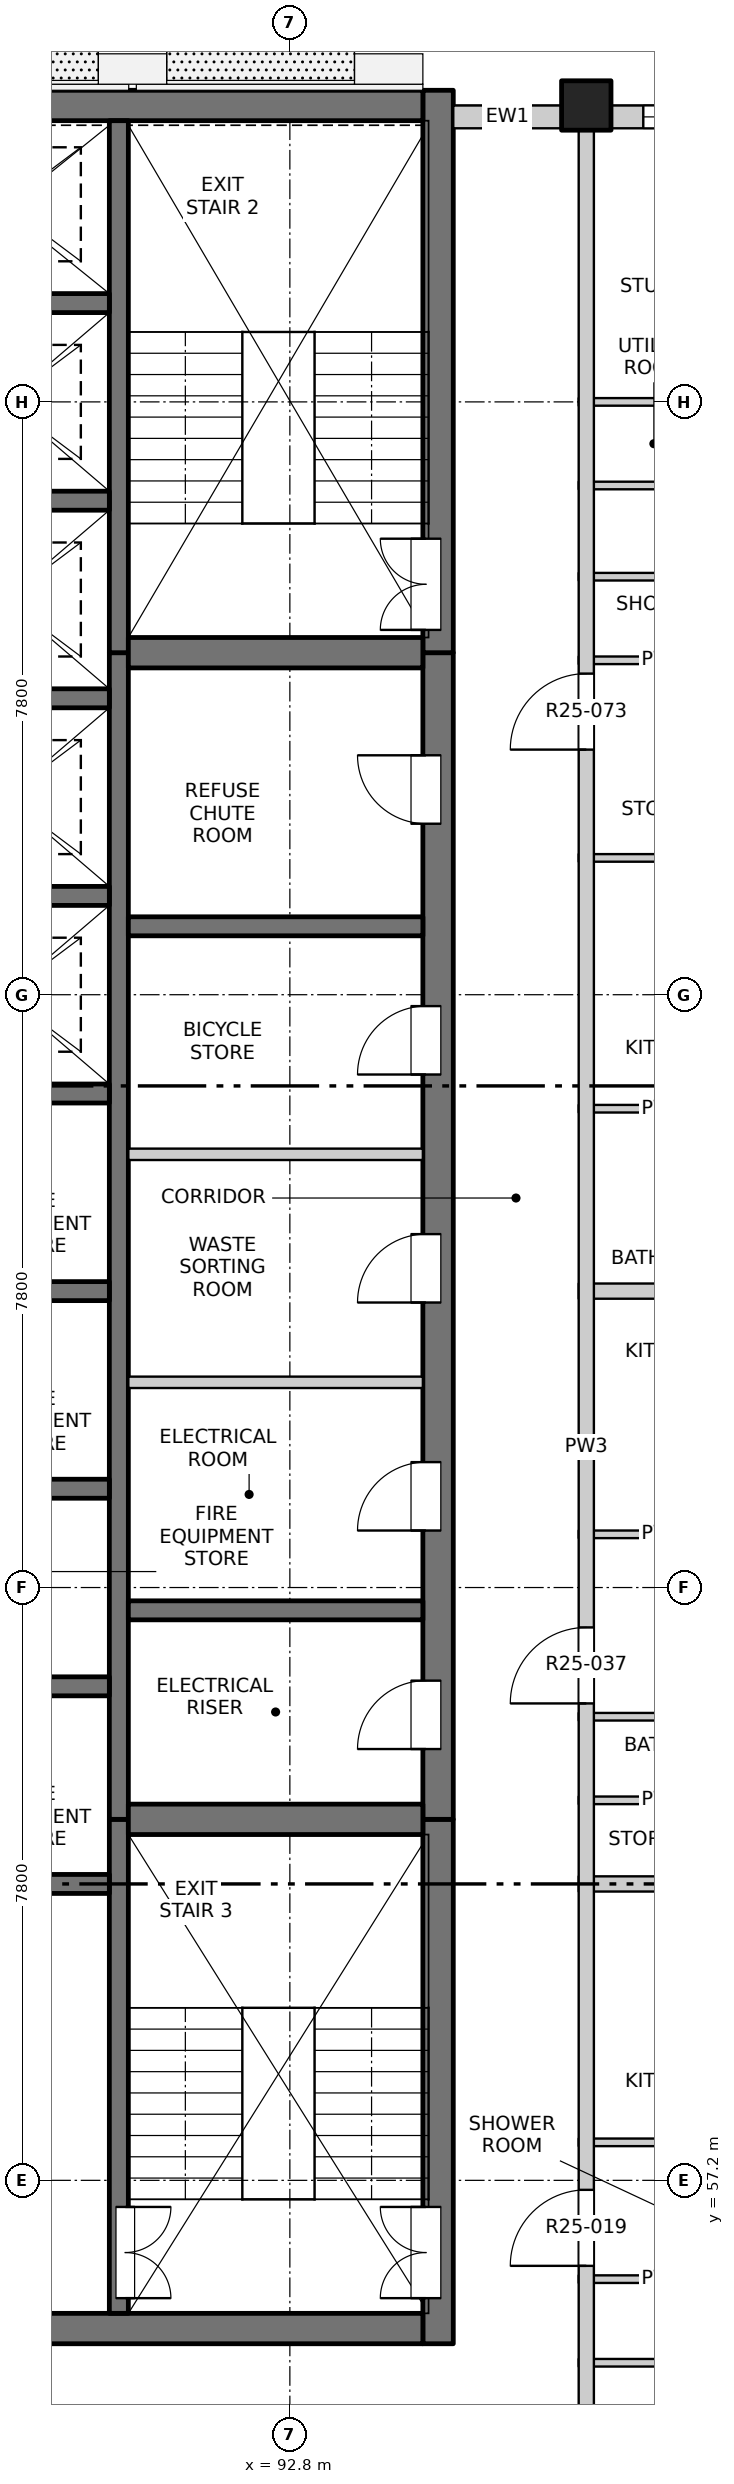
"""IFC4 building model, lengths in metres.
Left out: names, types, materials, properties, quantities, classifications, styles, units other than length and angle.
Written with IfcOpenShell. Run it as: python <this file> out.ifc"""

import sys

from ifc_helpers import new_model, si_unit, direction, frame, frame_2d, origin, origin_2d, place, context, subcontext, project, spatial, rectangle, extrude, element, fill, save


model = new_model("IFC4")
c1 = context("Model", 3, precision=1e-05, world=origin(), true_north=direction((0.0, 1.0)))
c2 = subcontext(c1, "Body", "Model", "MODEL_VIEW")
j1 = project(units=[si_unit("LENGTHUNIT", "METRE"), si_unit("PLANEANGLEUNIT", "RADIAN")], contexts=[c1])
p1 = place(None, origin())
s1 = spatial("IfcSite", under=j1, at=p1, CompositionType="ELEMENT")
p2 = place(p1, origin())
s2 = spatial("IfcBuilding", under=s1, at=p2, CompositionType="ELEMENT")
p3 = place(p2, frame((0.0, 0.0, 252.8)))
s3 = spatial("IfcBuildingStorey", under=s2, at=p3, CompositionType="ELEMENT", Elevation=252.8)
p4 = place(p3, frame((96.7, 84.5, -0.25), z_axis=(0.0, 0.0, 1.0), x_axis=(1.0, 0.0, 0.0)))
e1 = element("IfcColumn", 1, at=p4, inside=s3, PredefinedType="COLUMN", context=c2, shape_type="SweptSolid", body=[
    extrude(rectangle(XDim=0.65, YDim=0.65, at=origin_2d()), origin(), (0.0, 0.0, 1.0), 3.4),
])
p5 = place(p3, frame((94.75, 55.05, -0.25), z_axis=(0.0, 0.0, 1.0), x_axis=(0.0, 1.0, 0.0)))
e2 = element("IfcWall", 2, at=p5, inside=s3, PredefinedType="SOLIDWALL", context=c2, shape_type="SweptSolid", body=[
    extrude(rectangle(XDim=6.9, YDim=0.4, at=frame_2d((3.45, 0.0))), origin(), (0.0, 0.0, 1.0), 3.4),
])
p6 = place(p5, frame((0.6, 0.0, 0.25)))
e3 = element("IfcOpeningElement", 3, at=p6, cuts=e2, PredefinedType="OPENING", context=c2, shape_type="SweptSolid", body=[
    extrude(rectangle(XDim=1.2, YDim=2.1, at=frame_2d((0.6, 1.05))), frame((0.0, 0.21, 0.0), z_axis=(0.0, -1.0, 0.0), x_axis=(1.0, 0.0, 0.0)), (0.0, 0.0, 1.0), 0.42),
])
p7 = place(p3, frame((94.75, 61.95, -0.25), z_axis=(0.0, 0.0, 1.0), x_axis=(0.0, 1.0, 0.0)))
e4 = element("IfcWall", 4, at=p7, inside=s3, PredefinedType="SOLIDWALL", context=c2, shape_type="SweptSolid", body=[
    extrude(rectangle(XDim=15.35, YDim=0.4, at=frame_2d((7.675, 0.0))), origin(), (0.0, 0.0, 1.0), 3.4),
])
p8 = place(p7, frame((0.925, 0.0, 0.25)))
e5 = element("IfcOpeningElement", 5, at=p8, cuts=e4, PredefinedType="OPENING", context=c2, shape_type="SweptSolid", body=[
    extrude(rectangle(XDim=0.9, YDim=2.1, at=frame_2d((0.45, 1.05))), frame((0.0, 0.21, 0.0), z_axis=(0.0, -1.0, 0.0), x_axis=(1.0, 0.0, 0.0)), (0.0, 0.0, 1.0), 0.42),
])
p9 = place(p7, frame((3.8, 0.0, 0.25)))
e6 = element("IfcOpeningElement", 6, at=p9, cuts=e4, PredefinedType="OPENING", context=c2, shape_type="SweptSolid", body=[
    extrude(rectangle(XDim=0.9, YDim=2.1, at=frame_2d((0.45, 1.05))), frame((0.0, 0.21, 0.0), z_axis=(0.0, -1.0, 0.0), x_axis=(1.0, 0.0, 0.0)), (0.0, 0.0, 1.0), 0.42),
])
p10 = place(p7, frame((6.8, 0.0, 0.25)))
e7 = element("IfcOpeningElement", 7, at=p10, cuts=e4, PredefinedType="OPENING", context=c2, shape_type="SweptSolid", body=[
    extrude(rectangle(XDim=0.9, YDim=2.1, at=frame_2d((0.45, 1.05))), frame((0.0, 0.21, 0.0), z_axis=(0.0, -1.0, 0.0), x_axis=(1.0, 0.0, 0.0)), (0.0, 0.0, 1.0), 0.42),
])
p11 = place(p7, frame((9.8, 0.0, 0.25)))
e8 = element("IfcOpeningElement", 8, at=p11, cuts=e4, PredefinedType="OPENING", context=c2, shape_type="SweptSolid", body=[
    extrude(rectangle(XDim=0.9, YDim=2.1, at=frame_2d((0.45, 1.05))), frame((0.0, 0.21, 0.0), z_axis=(0.0, -1.0, 0.0), x_axis=(1.0, 0.0, 0.0)), (0.0, 0.0, 1.0), 0.42),
])
p12 = place(p7, frame((13.1, 0.0, 0.25)))
e9 = element("IfcOpeningElement", 9, at=p12, cuts=e4, PredefinedType="OPENING", context=c2, shape_type="SweptSolid", body=[
    extrude(rectangle(XDim=0.9, YDim=2.1, at=frame_2d((0.45, 1.05))), frame((0.0, 0.21, 0.0), z_axis=(0.0, -1.0, 0.0), x_axis=(1.0, 0.0, 0.0)), (0.0, 0.0, 1.0), 0.42),
])
p13 = place(p3, frame((94.75, 77.3, -0.25), z_axis=(0.0, 0.0, 1.0), x_axis=(0.0, 1.0, 0.0)))
e10 = element("IfcWall", 10, at=p13, inside=s3, PredefinedType="SOLIDWALL", context=c2, shape_type="SweptSolid", body=[
    extrude(rectangle(XDim=7.4, YDim=0.4, at=frame_2d((3.7, 0.0))), origin(), (0.0, 0.0, 1.0), 3.4),
])
p14 = place(p13, frame((0.3, 0.0, 0.25)))
e11 = element("IfcOpeningElement", 11, at=p14, cuts=e10, PredefinedType="OPENING", context=c2, shape_type="SweptSolid", body=[
    extrude(rectangle(XDim=1.2, YDim=2.1, at=frame_2d((0.6, 1.05))), frame((0.0, 0.21, 0.0), z_axis=(0.0, -1.0, 0.0), x_axis=(1.0, 0.0, 0.0)), (0.0, 0.0, 1.0), 0.42),
])
p15 = place(p3, frame((75.45, 55.25, -0.25), z_axis=(0.0, 0.0, 1.0), x_axis=(1.0, 0.0, 0.0)))
e12 = element("IfcWall", 12, at=p15, inside=s3, PredefinedType="SOLIDWALL", context=c2, shape_type="SweptSolid", body=[
    extrude(rectangle(XDim=19.1, YDim=0.4, at=frame_2d((9.55, 0.0))), origin(), (0.0, 0.0, 1.0), 3.4),
])
p16 = place(p15, frame((8.8, 0.0, 0.25)))
e13 = element("IfcOpeningElement", 13, at=p16, cuts=e12, PredefinedType="OPENING", context=c2, shape_type="SweptSolid", body=[
    extrude(rectangle(XDim=1.5, YDim=2.1, at=frame_2d((0.75, 1.05))), frame((0.0, 0.21, 0.0), z_axis=(0.0, -1.0, 0.0), x_axis=(1.0, 0.0, 0.0)), (0.0, 0.0, 1.0), 0.42),
])
p17 = place(p3, frame((75.45, 84.5, -0.25), z_axis=(0.0, 0.0, 1.0), x_axis=(1.0, 0.0, 0.0)))
e14 = element("IfcWall", 14, at=p17, inside=s3, PredefinedType="SOLIDWALL", context=c2, shape_type="SweptSolid", body=[
    extrude(rectangle(XDim=19.1, YDim=0.4, at=frame_2d((9.55, 0.0))), origin(), (0.0, 0.0, 1.0), 3.4),
])
p18 = place(p3, frame((90.55, 55.45, -0.25), z_axis=(0.0, 0.0, 1.0), x_axis=(0.0, 1.0, 0.0)))
e15 = element("IfcWall", 15, at=p18, inside=s3, PredefinedType="SOLIDWALL", context=c2, shape_type="SweptSolid", body=[
    extrude(rectangle(XDim=6.5, YDim=0.25, at=frame_2d((3.25, 0.0))), origin(), (0.0, 0.0, 1.0), 3.4),
])
p19 = place(p18, frame((0.2, 0.0, 0.25)))
e16 = element("IfcOpeningElement", 16, at=p19, cuts=e15, PredefinedType="OPENING", context=c2, shape_type="SweptSolid", body=[
    extrude(rectangle(XDim=1.2, YDim=2.1, at=frame_2d((0.6, 1.05))), frame((0.0, 0.135, 0.0), z_axis=(0.0, -1.0, 0.0), x_axis=(1.0, 0.0, 0.0)), (0.0, 0.0, 1.0), 0.27),
])
p20 = place(p3, frame((90.55, 61.95, -0.25), z_axis=(0.0, 0.0, 1.0), x_axis=(0.0, 1.0, 0.0)))
e17 = element("IfcWall", 17, at=p20, inside=s3, PredefinedType="SOLIDWALL", context=c2, shape_type="SweptSolid", body=[
    extrude(rectangle(XDim=15.35, YDim=0.25, at=frame_2d((7.675, 0.0))), origin(), (0.0, 0.0, 1.0), 3.4),
])
p21 = place(p3, frame((90.55, 77.3, -0.25), z_axis=(0.0, 0.0, 1.0), x_axis=(0.0, 1.0, 0.0)))
e18 = element("IfcWall", 18, at=p21, inside=s3, PredefinedType="SOLIDWALL", context=c2, shape_type="SweptSolid", body=[
    extrude(rectangle(XDim=7.0, YDim=0.25, at=frame_2d((3.5, 0.0))), origin(), (0.0, 0.0, 1.0), 3.4),
])
for number, where, z_axis, x_axis in (
    (19, (87.425, 61.1, -0.25), (0.0, 0.0, 1.0), (1.0, 0.0, 0.0)),
    (20, (87.425, 63.7, -0.25), (0.0, 0.0, 1.0), (1.0, 0.0, 0.0)),
    (21, (87.425, 66.3, -0.25), (0.0, 0.0, 1.0), (1.0, 0.0, 0.0)),
    (22, (87.425, 68.9, -0.25), (0.0, 0.0, 1.0), (1.0, 0.0, 0.0)),
    (23, (87.425, 71.5, -0.25), (0.0, 0.0, 1.0), (1.0, 0.0, 0.0)),
    (24, (87.425, 74.1, -0.25), (0.0, 0.0, 1.0), (1.0, 0.0, 0.0)),
    (25, (87.425, 76.7, -0.25), (0.0, 0.0, 1.0), (1.0, 0.0, 0.0)),
    (26, (87.425, 79.3, -0.25), (0.0, 0.0, 1.0), (1.0, 0.0, 0.0)),
    (27, (87.425, 81.9, -0.25), (0.0, 0.0, 1.0), (1.0, 0.0, 0.0)),
):
    element("IfcWall", number, at=place(p3, frame(where, z_axis=z_axis, x_axis=x_axis)), inside=s3, PredefinedType="SOLIDWALL", context=c2, shape_type="SweptSolid", body=[
        extrude(rectangle(XDim=3.0, YDim=0.25, at=frame_2d((1.5, 0.0))), origin(), (0.0, 0.0, 1.0), 3.4),
    ])
p22 = place(p3, frame((90.675, 61.95, -0.25), z_axis=(0.0, 0.0, 1.0), x_axis=(1.0, 0.0, 0.0)))
e28 = element("IfcWall", 28, at=p22, inside=s3, PredefinedType="SOLIDWALL", context=c2, shape_type="SweptSolid", body=[
    extrude(rectangle(XDim=3.875, YDim=0.4, at=frame_2d((1.938, 0.0))), origin(), (0.0, 0.0, 1.0), 3.4),
])
for number, where, z_axis, x_axis in (
    (29, (90.675, 64.7, -0.25), (0.0, 0.0, 1.0), (1.0, 0.0, 0.0)),
    (30, (90.675, 73.7, -0.25), (0.0, 0.0, 1.0), (1.0, 0.0, 0.0)),
):
    element("IfcWall", number, at=place(p3, frame(where, z_axis=z_axis, x_axis=x_axis)), inside=s3, PredefinedType="SOLIDWALL", context=c2, shape_type="SweptSolid", body=[
        extrude(rectangle(XDim=3.875, YDim=0.25, at=frame_2d((1.938, 0.0))), origin(), (0.0, 0.0, 1.0), 3.4),
    ])
p23 = place(p3, frame((90.675, 77.3, -0.25), z_axis=(0.0, 0.0, 1.0), x_axis=(1.0, 0.0, 0.0)))
e31 = element("IfcWall", 31, at=p23, inside=s3, PredefinedType="SOLIDWALL", context=c2, shape_type="SweptSolid", body=[
    extrude(rectangle(XDim=3.875, YDim=0.4, at=frame_2d((1.938, 0.0))), origin(), (0.0, 0.0, 1.0), 3.4),
])
p24 = place(p3, frame((94.95, 84.35, 0.0), z_axis=(0.0, 0.0, 1.0), x_axis=(1.0, 0.0, 0.0)))
e32 = element("IfcWall", 32, at=p24, inside=s3, PredefinedType="SOLIDWALL", context=c2, shape_type="SweptSolid", body=[
    extrude(rectangle(XDim=1.425, YDim=0.3, at=frame_2d((0.712, 0.0))), origin(), (0.0, 0.0, 1.0), 2.7),
])
p25 = place(p3, frame((97.025, 84.35, 0.0), z_axis=(0.0, 0.0, 1.0), x_axis=(1.0, 0.0, 0.0)))
e33 = element("IfcWall", 33, at=p25, inside=s3, PredefinedType="SOLIDWALL", context=c2, shape_type="SweptSolid", body=[
    extrude(rectangle(XDim=3.575, YDim=0.3, at=frame_2d((1.788, 0.0))), origin(), (0.0, 0.0, 1.0), 2.7),
])
p26 = place(p25, frame((0.425, 0.0, 0.9)))
e34 = element("IfcOpeningElement", 34, at=p26, cuts=e33, PredefinedType="OPENING", context=c2, shape_type="SweptSolid", body=[
    extrude(rectangle(XDim=2.4, YDim=1.8, at=frame_2d((1.2, 0.9))), frame((0.0, 0.16, 0.0), z_axis=(0.0, -1.0, 0.0), x_axis=(1.0, 0.0, 0.0)), (0.0, 0.0, 1.0), 0.32),
])
for number, where, z_axis, x_axis in (
    (35, (96.6, 54.8, 0.0), (0.0, 0.0, 1.0), (1.0, 0.0, 0.0)),
    (36, (96.6, 55.9, 0.0), (0.0, 0.0, 1.0), (1.0, 0.0, 0.0)),
    (37, (96.6, 57.7, 0.0), (0.0, 0.0, 1.0), (1.0, 0.0, 0.0)),
):
    element("IfcWall", number, at=place(p3, frame(where, z_axis=z_axis, x_axis=x_axis)), inside=s3, PredefinedType="PARTITIONING", context=c2, shape_type="SweptSolid", body=[
        extrude(rectangle(XDim=2.22, YDim=0.1, at=frame_2d((1.11, 0.0))), origin(), (0.0, 0.0, 1.0), 3.15),
    ])
p27 = place(p3, frame((96.6, 61.1, 0.0), z_axis=(0.0, 0.0, 1.0), x_axis=(1.0, 0.0, 0.0)))
e38 = element("IfcWall", 38, at=p27, inside=s3, PredefinedType="PARTITIONING", context=c2, shape_type="SweptSolid", body=[
    extrude(rectangle(XDim=7.6, YDim=0.2, at=frame_2d((3.8, 0.0))), origin(), (0.0, 0.0, 1.0), 2.55),
])
for number, where, z_axis, x_axis in (
    (39, (96.6, 62.2, 0.0), (0.0, 0.0, 1.0), (1.0, 0.0, 0.0)),
    (40, (96.6, 63.3, 0.0), (0.0, 0.0, 1.0), (1.0, 0.0, 0.0)),
    (41, (96.6, 65.7, 0.0), (0.0, 0.0, 1.0), (1.0, 0.0, 0.0)),
):
    element("IfcWall", number, at=place(p3, frame(where, z_axis=z_axis, x_axis=x_axis)), inside=s3, PredefinedType="PARTITIONING", context=c2, shape_type="SweptSolid", body=[
        extrude(rectangle(XDim=2.22, YDim=0.1, at=frame_2d((1.11, 0.0))), origin(), (0.0, 0.0, 1.0), 3.15),
    ])
p28 = place(p3, frame((90.675, 67.7, 0.0), z_axis=(0.0, 0.0, 1.0), x_axis=(1.0, 0.0, 0.0)))
e42 = element("IfcWall", 42, at=p28, inside=s3, PredefinedType="PARTITIONING", context=c2, shape_type="SweptSolid", body=[
    extrude(rectangle(XDim=3.875, YDim=0.15, at=frame_2d((1.938, 0.0))), origin(), (0.0, 0.0, 1.0), 3.15),
])
p29 = place(p3, frame((96.6, 68.9, 0.0), z_axis=(0.0, 0.0, 1.0), x_axis=(1.0, 0.0, 0.0)))
e43 = element("IfcWall", 43, at=p29, inside=s3, PredefinedType="PARTITIONING", context=c2, shape_type="SweptSolid", body=[
    extrude(rectangle(XDim=7.6, YDim=0.2, at=frame_2d((3.8, 0.0))), origin(), (0.0, 0.0, 1.0), 2.55),
])
p30 = place(p3, frame((90.675, 70.7, 0.0), z_axis=(0.0, 0.0, 1.0), x_axis=(1.0, 0.0, 0.0)))
e44 = element("IfcWall", 44, at=p30, inside=s3, PredefinedType="PARTITIONING", context=c2, shape_type="SweptSolid", body=[
    extrude(rectangle(XDim=3.875, YDim=0.15, at=frame_2d((1.938, 0.0))), origin(), (0.0, 0.0, 1.0), 3.15),
])
for number, where, z_axis, x_axis in (
    (45, (96.6, 71.3, 0.0), (0.0, 0.0, 1.0), (1.0, 0.0, 0.0)),
    (46, (96.6, 74.6, 0.0), (0.0, 0.0, 1.0), (1.0, 0.0, 0.0)),
    (47, (96.6, 77.2, 0.0), (0.0, 0.0, 1.0), (1.0, 0.0, 0.0)),
    (48, (96.6, 78.3, 0.0), (0.0, 0.0, 1.0), (1.0, 0.0, 0.0)),
    (49, (96.6, 79.5, 0.0), (0.0, 0.0, 1.0), (1.0, 0.0, 0.0)),
):
    element("IfcWall", number, at=place(p3, frame(where, z_axis=z_axis, x_axis=x_axis)), inside=s3, PredefinedType="PARTITIONING", context=c2, shape_type="SweptSolid", body=[
        extrude(rectangle(XDim=2.22, YDim=0.1, at=frame_2d((1.11, 0.0))), origin(), (0.0, 0.0, 1.0), 3.15),
    ])
p31 = place(p3, frame((96.6, 80.6, 0.0), z_axis=(0.0, 0.0, 1.0), x_axis=(1.0, 0.0, 0.0)))
e50 = element("IfcWall", 50, at=p31, inside=s3, PredefinedType="PARTITIONING", context=c2, shape_type="SweptSolid", body=[
    extrude(rectangle(XDim=7.6, YDim=0.1, at=frame_2d((3.8, 0.0))), origin(), (0.0, 0.0, 1.0), 3.15),
])
p32 = place(p31, frame((2.61, 0.0, 0.0)))
e51 = element("IfcOpeningElement", 51, at=p32, cuts=e50, PredefinedType="OPENING", context=c2, shape_type="SweptSolid", body=[
    extrude(rectangle(XDim=0.9, YDim=2.1, at=frame_2d((0.45, 1.05))), frame((0.0, 0.06, 0.0), z_axis=(0.0, -1.0, 0.0), x_axis=(1.0, 0.0, 0.0)), (0.0, 0.0, 1.0), 0.12),
])
p33 = place(p3, frame((96.7, 49.5, 0.0), z_axis=(0.0, 0.0, 1.0), x_axis=(0.0, 1.0, 0.0)))
e52 = element("IfcWall", 52, at=p33, inside=s3, PredefinedType="PARTITIONING", context=c2, shape_type="SweptSolid", body=[
    extrude(rectangle(XDim=34.7, YDim=0.2, at=frame_2d((17.35, 0.0))), origin(), (0.0, 0.0, 1.0), 3.15),
])
p34 = place(p33, frame((6.575, 0.0, 0.0)))
e53 = element("IfcOpeningElement", 53, at=p34, cuts=e52, PredefinedType="OPENING", context=c2, shape_type="SweptSolid", body=[
    extrude(rectangle(XDim=1.0, YDim=2.1, at=frame_2d((0.5, 1.05))), frame((0.0, 0.11, 0.0), z_axis=(0.0, -1.0, 0.0), x_axis=(1.0, 0.0, 0.0)), (0.0, 0.0, 1.0), 0.22),
])
p35 = place(p33, frame((13.975, 0.0, 0.0)))
e54 = element("IfcOpeningElement", 54, at=p35, cuts=e52, PredefinedType="OPENING", context=c2, shape_type="SweptSolid", body=[
    extrude(rectangle(XDim=1.0, YDim=2.1, at=frame_2d((0.5, 1.05))), frame((0.0, 0.11, 0.0), z_axis=(0.0, -1.0, 0.0), x_axis=(1.0, 0.0, 0.0)), (0.0, 0.0, 1.0), 0.22),
])
p36 = place(p33, frame((26.525, 0.0, 0.0)))
e55 = element("IfcOpeningElement", 55, at=p36, cuts=e52, PredefinedType="OPENING", context=c2, shape_type="SweptSolid", body=[
    extrude(rectangle(XDim=1.0, YDim=2.1, at=frame_2d((0.5, 1.05))), frame((0.0, 0.11, 0.0), z_axis=(0.0, -1.0, 0.0), x_axis=(1.0, 0.0, 0.0)), (0.0, 0.0, 1.0), 0.22),
])
p37 = place(p26, origin())
e56 = element("IfcWindow", 56, at=p37, inside=s3, PartitioningType="DOUBLE_PANEL_VERTICAL", PredefinedType="WINDOW", context=c2, shape_type="SweptSolid", body=[
    extrude(rectangle(XDim=2.4, YDim=1.8, at=frame_2d((1.2, 0.9))), frame((0.0, 0.03, 0.0), z_axis=(0.0, -1.0, 0.0), x_axis=(1.0, 0.0, 0.0)), (0.0, 0.0, 1.0), 0.06),
])
fill(e34, e56)
p38 = place(p19, origin())
e57 = element("IfcDoor", 57, at=p38, inside=s3, OperationType="DOUBLE_DOOR_SINGLE_SWING", PredefinedType="DOOR", context=c2, shape_type="SweptSolid", body=[
    extrude(rectangle(XDim=1.2, YDim=2.1, at=frame_2d((0.6, 1.05))), frame((0.0, -0.06, 0.0), z_axis=(0.0, -1.0, 0.0), x_axis=(1.0, 0.0, 0.0)), (0.0, 0.0, 1.0), 0.05),
])
fill(e16, e57)
p39 = place(p6, origin())
e58 = element("IfcDoor", 58, at=p39, inside=s3, OperationType="DOUBLE_DOOR_SINGLE_SWING", PredefinedType="DOOR", context=c2, shape_type="SweptSolid", body=[
    extrude(rectangle(XDim=1.2, YDim=2.1, at=frame_2d((0.6, 1.05))), frame((0.0, 0.185, 0.0), z_axis=(0.0, -1.0, 0.0), x_axis=(1.0, 0.0, 0.0)), (0.0, 0.0, 1.0), 0.05),
])
fill(e3, e58)
p40 = place(p34, origin())
e59 = element("IfcDoor", 59, at=p40, inside=s3, OperationType="SINGLE_SWING_LEFT", PredefinedType="DOOR", context=c2, shape_type="SweptSolid", body=[
    extrude(rectangle(XDim=1.0, YDim=2.1, at=frame_2d((0.5, 1.05))), frame((0.0, 0.025, 0.0), z_axis=(0.0, -1.0, 0.0), x_axis=(1.0, 0.0, 0.0)), (0.0, 0.0, 1.0), 0.05),
])
fill(e53, e59)
p41 = place(p8, origin())
e60 = element("IfcDoor", 60, at=p41, inside=s3, OperationType="SINGLE_SWING_LEFT", PredefinedType="DOOR", context=c2, shape_type="SweptSolid", body=[
    extrude(rectangle(XDim=0.9, YDim=2.1, at=frame_2d((0.45, 1.05))), frame((0.0, 0.185, 0.0), z_axis=(0.0, -1.0, 0.0), x_axis=(1.0, 0.0, 0.0)), (0.0, 0.0, 1.0), 0.05),
])
fill(e5, e60)
p42 = place(p35, origin())
e61 = element("IfcDoor", 61, at=p42, inside=s3, OperationType="SINGLE_SWING_LEFT", PredefinedType="DOOR", context=c2, shape_type="SweptSolid", body=[
    extrude(rectangle(XDim=1.0, YDim=2.1, at=frame_2d((0.5, 1.05))), frame((0.0, 0.025, 0.0), z_axis=(0.0, -1.0, 0.0), x_axis=(1.0, 0.0, 0.0)), (0.0, 0.0, 1.0), 0.05),
])
fill(e54, e61)
p43 = place(p9, origin())
e62 = element("IfcDoor", 62, at=p43, inside=s3, OperationType="SINGLE_SWING_LEFT", PredefinedType="DOOR", context=c2, shape_type="SweptSolid", body=[
    extrude(rectangle(XDim=0.9, YDim=2.1, at=frame_2d((0.45, 1.05))), frame((0.0, 0.185, 0.0), z_axis=(0.0, -1.0, 0.0), x_axis=(1.0, 0.0, 0.0)), (0.0, 0.0, 1.0), 0.05),
])
fill(e6, e62)
p44 = place(p10, origin())
e63 = element("IfcDoor", 63, at=p44, inside=s3, OperationType="SINGLE_SWING_LEFT", PredefinedType="DOOR", context=c2, shape_type="SweptSolid", body=[
    extrude(rectangle(XDim=0.9, YDim=2.1, at=frame_2d((0.45, 1.05))), frame((0.0, 0.185, 0.0), z_axis=(0.0, -1.0, 0.0), x_axis=(1.0, 0.0, 0.0)), (0.0, 0.0, 1.0), 0.05),
])
fill(e7, e63)
p45 = place(p11, origin())
e64 = element("IfcDoor", 64, at=p45, inside=s3, OperationType="SINGLE_SWING_LEFT", PredefinedType="DOOR", context=c2, shape_type="SweptSolid", body=[
    extrude(rectangle(XDim=0.9, YDim=2.1, at=frame_2d((0.45, 1.05))), frame((0.0, 0.185, 0.0), z_axis=(0.0, -1.0, 0.0), x_axis=(1.0, 0.0, 0.0)), (0.0, 0.0, 1.0), 0.05),
])
fill(e8, e64)
p46 = place(p12, origin())
e65 = element("IfcDoor", 65, at=p46, inside=s3, OperationType="SINGLE_SWING_RIGHT", PredefinedType="DOOR", context=c2, shape_type="SweptSolid", body=[
    extrude(rectangle(XDim=0.9, YDim=2.1, at=frame_2d((0.45, 1.05))), frame((0.0, 0.185, 0.0), z_axis=(0.0, -1.0, 0.0), x_axis=(1.0, 0.0, 0.0)), (0.0, 0.0, 1.0), 0.05),
])
fill(e9, e65)
p47 = place(p36, origin())
e66 = element("IfcDoor", 66, at=p47, inside=s3, OperationType="SINGLE_SWING_RIGHT", PredefinedType="DOOR", context=c2, shape_type="SweptSolid", body=[
    extrude(rectangle(XDim=1.0, YDim=2.1, at=frame_2d((0.5, 1.05))), frame((0.0, 0.025, 0.0), z_axis=(0.0, -1.0, 0.0), x_axis=(1.0, 0.0, 0.0)), (0.0, 0.0, 1.0), 0.05),
])
fill(e55, e66)
p48 = place(p14, origin())
e67 = element("IfcDoor", 67, at=p48, inside=s3, OperationType="DOUBLE_DOOR_SINGLE_SWING", PredefinedType="DOOR", context=c2, shape_type="SweptSolid", body=[
    extrude(rectangle(XDim=1.2, YDim=2.1, at=frame_2d((0.6, 1.05))), frame((0.0, 0.185, 0.0), z_axis=(0.0, -1.0, 0.0), x_axis=(1.0, 0.0, 0.0)), (0.0, 0.0, 1.0), 0.05),
])
fill(e11, e67)
save(model, sys.argv[1])
